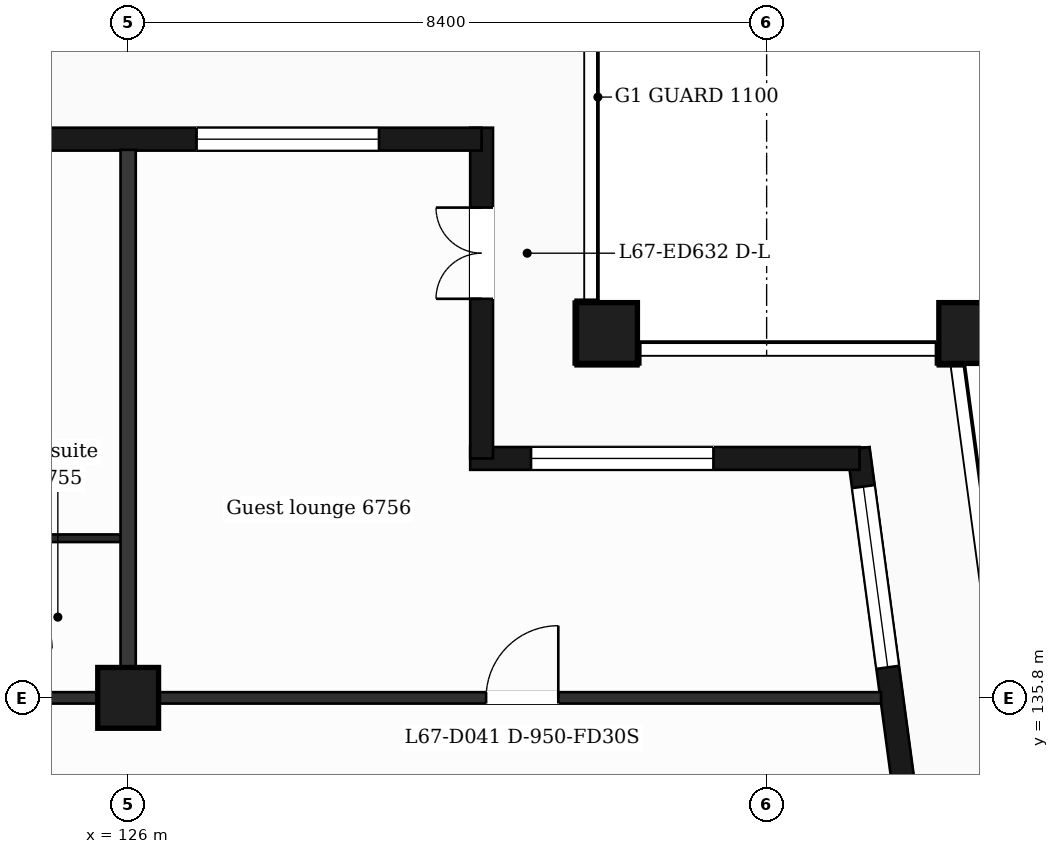
"""IFC4 building model, lengths in metres.
Left out: names, types, materials, properties, quantities, classifications, styles, units other than length and angle.
Written with IfcOpenShell. Run it as: python <this file> out.ifc"""

import sys

from ifc_helpers import new_model, si_unit, direction, frame, frame_2d, origin, origin_2d, place, context, subcontext, project, spatial, rectangle, extrude, element, fill, save


model = new_model("IFC4")
c1 = context("Model", 3, precision=1e-05, world=origin(), true_north=direction((0.0, 1.0)))
c2 = subcontext(c1, "Body", "Model", "MODEL_VIEW")
j1 = project(units=[si_unit("LENGTHUNIT", "METRE"), si_unit("PLANEANGLEUNIT", "RADIAN")], contexts=[c1])
p1 = place(None, origin())
s1 = spatial("IfcSite", under=j1, at=p1, CompositionType="ELEMENT")
p2 = place(p1, origin())
s2 = spatial("IfcBuilding", under=s1, at=p2, CompositionType="ELEMENT")
p3 = place(p2, frame((0.0, 0.0, 277.5)))
s3 = spatial("IfcBuildingStorey", under=s2, at=p3, CompositionType="ELEMENT", Elevation=277.5)
for number, where, z_axis, x_axis in (
    (1, (132.3, 140.6, 0.0), (0.0, 0.0, 1.0), (1.0, 0.0, 0.0)),
    (2, (137.065, 140.6, 0.0), (0.0, 0.0, 1.0), (1.0, 0.0, 0.0)),
    (3, (126.0, 135.8, 0.0), (0.0, 0.0, 1.0), (1.0, 0.0, 0.0)),
):
    element("IfcColumn", number, at=place(p3, frame(where, z_axis=z_axis, x_axis=x_axis)), inside=s3, PredefinedType="COLUMN", context=c2, shape_type="SweptSolid", body=[
        extrude(rectangle(XDim=0.8, YDim=0.8, at=origin_2d()), origin(), (0.0, 0.0, 1.0), 3.7),
    ])
p4 = place(p3, frame((136.504, 132.4, 0.0), z_axis=(0.0, 0.0, 1.0), x_axis=(-0.133399697462, 0.99106231929, 0.0)))
e4 = element("IfcWall", 4, at=p4, inside=s3, PredefinedType="SOLIDWALL", context=c2, shape_type="SweptSolid", body=[
    extrude(rectangle(XDim=6.74, YDim=0.3, at=frame_2d((3.37, 0.0))), origin(), (0.0, 0.0, 1.0), 3.38),
])
p5 = place(p4, frame((1.115, 0.0, 0.0)))
e5 = element("IfcOpeningElement", 5, at=p5, cuts=e4, PredefinedType="OPENING", context=c2, shape_type="SweptSolid", body=[
    extrude(rectangle(XDim=1.2, YDim=2.4, at=frame_2d((0.6, 1.2))), frame((0.0, 0.16, 0.0), z_axis=(0.0, -1.0, 0.0), x_axis=(1.0, 0.0, 0.0)), (0.0, 0.0, 1.0), 0.32),
])
p6 = place(p4, frame((3.835, 0.0, 0.9)))
e6 = element("IfcOpeningElement", 6, at=p6, cuts=e4, PredefinedType="OPENING", context=c2, shape_type="SweptSolid", body=[
    extrude(rectangle(XDim=2.4, YDim=2.1, at=frame_2d((1.2, 1.05))), frame((0.0, 0.16, 0.0), z_axis=(0.0, -1.0, 0.0), x_axis=(1.0, 0.0, 0.0)), (0.0, 0.0, 1.0), 0.32),
])
p7 = place(p3, frame((135.623, 138.95, 0.0), z_axis=(0.0, 0.0, 1.0), x_axis=(-1.0, 0.0, 0.0)))
e7 = element("IfcWall", 7, at=p7, inside=s3, PredefinedType="SOLIDWALL", context=c2, shape_type="SweptSolid", body=[
    extrude(rectangle(XDim=5.123, YDim=0.3, at=frame_2d((2.561, 0.0))), origin(), (0.0, 0.0, 1.0), 3.38),
])
p8 = place(p7, frame((1.923, 0.0, 0.9)))
e8 = element("IfcOpeningElement", 8, at=p8, cuts=e7, PredefinedType="OPENING", context=c2, shape_type="SweptSolid", body=[
    extrude(rectangle(XDim=2.4, YDim=2.1, at=frame_2d((1.2, 1.05))), frame((0.0, 0.16, 0.0), z_axis=(0.0, -1.0, 0.0), x_axis=(1.0, 0.0, 0.0)), (0.0, 0.0, 1.0), 0.32),
])
p9 = place(p3, frame((130.65, 138.95, 0.0), z_axis=(0.0, 0.0, 1.0), x_axis=(0.0, 1.0, 0.0)))
e9 = element("IfcWall", 9, at=p9, inside=s3, PredefinedType="SOLIDWALL", context=c2, shape_type="SweptSolid", body=[
    extrude(rectangle(XDim=4.35, YDim=0.3, at=frame_2d((2.175, 0.0))), origin(), (0.0, 0.0, 1.0), 3.38),
])
p10 = place(p9, frame((2.1, 0.0, 0.0)))
e10 = element("IfcOpeningElement", 10, at=p10, cuts=e9, PredefinedType="OPENING", context=c2, shape_type="SweptSolid", body=[
    extrude(rectangle(XDim=1.2, YDim=2.4, at=frame_2d((0.6, 1.2))), frame((0.0, 0.16, 0.0), z_axis=(0.0, -1.0, 0.0), x_axis=(1.0, 0.0, 0.0)), (0.0, 0.0, 1.0), 0.32),
])
p11 = place(p3, frame((130.65, 143.15, 0.0), z_axis=(0.0, 0.0, 1.0), x_axis=(-1.0, 0.0, 0.0)))
e11 = element("IfcWall", 11, at=p11, inside=s3, PredefinedType="SOLIDWALL", context=c2, shape_type="SweptSolid", body=[
    extrude(rectangle(XDim=14.25, YDim=0.3, at=frame_2d((7.125, 0.0))), origin(), (0.0, 0.0, 1.0), 3.38),
])
p12 = place(p11, frame((1.35, 0.0, 0.9)))
e12 = element("IfcOpeningElement", 12, at=p12, cuts=e11, PredefinedType="OPENING", context=c2, shape_type="SweptSolid", body=[
    extrude(rectangle(XDim=2.4, YDim=2.1, at=frame_2d((1.2, 1.05))), frame((0.0, 0.16, 0.0), z_axis=(0.0, -1.0, 0.0), x_axis=(1.0, 0.0, 0.0)), (0.0, 0.0, 1.0), 0.32),
])
p13 = place(p11, frame((6.15, 0.0, 0.0)))
e13 = element("IfcOpeningElement", 13, at=p13, cuts=e11, PredefinedType="OPENING", context=c2, shape_type="SweptSolid", body=[
    extrude(rectangle(XDim=1.2, YDim=2.4, at=frame_2d((0.6, 1.2))), frame((0.0, 0.16, 0.0), z_axis=(0.0, -1.0, 0.0), x_axis=(1.0, 0.0, 0.0)), (0.0, 0.0, 1.0), 0.32),
])
p14 = place(p11, frame((9.75, 0.0, 0.9)))
e14 = element("IfcOpeningElement", 14, at=p14, cuts=e11, PredefinedType="OPENING", context=c2, shape_type="SweptSolid", body=[
    extrude(rectangle(XDim=2.4, YDim=2.1, at=frame_2d((1.2, 1.05))), frame((0.0, 0.16, 0.0), z_axis=(0.0, -1.0, 0.0), x_axis=(1.0, 0.0, 0.0)), (0.0, 0.0, 1.0), 0.32),
])
p15 = place(p3, frame((90.895, 135.8, 0.0), z_axis=(0.0, 0.0, 1.0), x_axis=(1.0, 0.0, 0.0)))
e15 = element("IfcWall", 15, at=p15, inside=s3, PredefinedType="PARTITIONING", context=c2, shape_type="SweptSolid", body=[
    extrude(rectangle(XDim=45.011, YDim=0.15, at=frame_2d((22.505, 0.0))), origin(), (0.0, 0.0, 1.0), 3.38),
])
p16 = place(p15, frame((8.005, 0.0, 0.0)))
e16 = element("IfcOpeningElement", 16, at=p16, cuts=e15, PredefinedType="OPENING", context=c2, shape_type="SweptSolid", body=[
    extrude(rectangle(XDim=1.0, YDim=2.1, at=frame_2d((0.5, 1.05))), frame((0.0, 0.085, 0.0), z_axis=(0.0, -1.0, 0.0), x_axis=(1.0, 0.0, 0.0)), (0.0, 0.0, 1.0), 0.17),
])
p17 = place(p15, frame((10.515, 0.0, 0.0)))
e17 = element("IfcOpeningElement", 17, at=p17, cuts=e15, PredefinedType="OPENING", context=c2, shape_type="SweptSolid", body=[
    extrude(rectangle(XDim=1.0, YDim=2.1, at=frame_2d((0.5, 1.05))), frame((0.0, 0.085, 0.0), z_axis=(0.0, -1.0, 0.0), x_axis=(1.0, 0.0, 0.0)), (0.0, 0.0, 1.0), 0.17),
])
p18 = place(p15, frame((20.156, 0.0, 0.0)))
e18 = element("IfcOpeningElement", 18, at=p18, cuts=e15, PredefinedType="OPENING", context=c2, shape_type="SweptSolid", body=[
    extrude(rectangle(XDim=1.0, YDim=2.1, at=frame_2d((0.5, 1.05))), frame((0.0, 0.085, 0.0), z_axis=(0.0, -1.0, 0.0), x_axis=(1.0, 0.0, 0.0)), (0.0, 0.0, 1.0), 0.17),
])
p19 = place(p15, frame((24.13, 0.0, 0.0)))
e19 = element("IfcOpeningElement", 19, at=p19, cuts=e15, PredefinedType="OPENING", context=c2, shape_type="SweptSolid", body=[
    extrude(rectangle(XDim=0.95, YDim=2.1, at=frame_2d((0.475, 1.05))), frame((0.0, 0.085, 0.0), z_axis=(0.0, -1.0, 0.0), x_axis=(1.0, 0.0, 0.0)), (0.0, 0.0, 1.0), 0.17),
])
p20 = place(p15, frame((29.492, 0.0, 0.0)))
e20 = element("IfcOpeningElement", 20, at=p20, cuts=e15, PredefinedType="OPENING", context=c2, shape_type="SweptSolid", body=[
    extrude(rectangle(XDim=0.95, YDim=2.1, at=frame_2d((0.475, 1.05))), frame((0.0, 0.085, 0.0), z_axis=(0.0, -1.0, 0.0), x_axis=(1.0, 0.0, 0.0)), (0.0, 0.0, 1.0), 0.17),
])
p21 = place(p15, frame((31.705, 0.0, 0.0)))
e21 = element("IfcOpeningElement", 21, at=p21, cuts=e15, PredefinedType="OPENING", context=c2, shape_type="SweptSolid", body=[
    extrude(rectangle(XDim=0.95, YDim=2.1, at=frame_2d((0.475, 1.05))), frame((0.0, 0.085, 0.0), z_axis=(0.0, -1.0, 0.0), x_axis=(1.0, 0.0, 0.0)), (0.0, 0.0, 1.0), 0.17),
])
p22 = place(p15, frame((39.814, 0.0, 0.0)))
e22 = element("IfcOpeningElement", 22, at=p22, cuts=e15, PredefinedType="OPENING", context=c2, shape_type="SweptSolid", body=[
    extrude(rectangle(XDim=0.95, YDim=2.1, at=frame_2d((0.475, 1.05))), frame((0.0, 0.085, 0.0), z_axis=(0.0, -1.0, 0.0), x_axis=(1.0, 0.0, 0.0)), (0.0, 0.0, 1.0), 0.17),
])
p23 = place(p3, frame((124.15, 137.9, 0.0), z_axis=(0.0, 0.0, 1.0), x_axis=(1.0, 0.0, 0.0)))
e23 = element("IfcWall", 23, at=p23, inside=s3, PredefinedType="PARTITIONING", context=c2, shape_type="SweptSolid", body=[
    extrude(rectangle(XDim=1.85, YDim=0.1, at=frame_2d((0.925, 0.0))), origin(), (0.0, 0.0, 1.0), 3.38),
])
p24 = place(p3, frame((126.0, 135.875, 0.0), z_axis=(0.0, 0.0, 1.0), x_axis=(0.0, 1.0, 0.0)))
e24 = element("IfcWall", 24, at=p24, inside=s3, PredefinedType="PARTITIONING", context=c2, shape_type="SweptSolid", body=[
    extrude(rectangle(XDim=7.135, YDim=0.2, at=frame_2d((3.567, 0.0))), origin(), (0.0, 0.0, 1.0), 3.38),
])
p25 = place(p6, origin())
e25 = element("IfcWindow", 25, at=p25, inside=s3, PartitioningType="SINGLE_PANEL", PredefinedType="WINDOW", context=c2, shape_type="SweptSolid", body=[
    extrude(rectangle(XDim=2.4, YDim=2.1, at=frame_2d((1.2, 1.05))), frame((0.0, 0.03, 0.0), z_axis=(0.0, -1.0, 0.0), x_axis=(1.0, 0.0, 0.0)), (0.0, 0.0, 1.0), 0.06),
])
fill(e6, e25)
p26 = place(p8, origin())
e26 = element("IfcWindow", 26, at=p26, inside=s3, PartitioningType="SINGLE_PANEL", PredefinedType="WINDOW", context=c2, shape_type="SweptSolid", body=[
    extrude(rectangle(XDim=2.4, YDim=2.1, at=frame_2d((1.2, 1.05))), frame((0.0, 0.03, 0.0), z_axis=(0.0, -1.0, 0.0), x_axis=(1.0, 0.0, 0.0)), (0.0, 0.0, 1.0), 0.06),
])
fill(e8, e26)
p27 = place(p10, origin())
e27 = element("IfcDoor", 27, at=p27, inside=s3, OperationType="DOUBLE_DOOR_SINGLE_SWING", PredefinedType="DOOR", context=c2, shape_type="SweptSolid", body=[
    extrude(rectangle(XDim=1.2, YDim=2.4, at=frame_2d((0.6, 1.2))), frame((0.0, 0.025, 0.0), z_axis=(0.0, -1.0, 0.0), x_axis=(1.0, 0.0, 0.0)), (0.0, 0.0, 1.0), 0.05),
])
fill(e10, e27)
p28 = place(p12, origin())
e28 = element("IfcWindow", 28, at=p28, inside=s3, PartitioningType="SINGLE_PANEL", PredefinedType="WINDOW", context=c2, shape_type="SweptSolid", body=[
    extrude(rectangle(XDim=2.4, YDim=2.1, at=frame_2d((1.2, 1.05))), frame((0.0, 0.03, 0.0), z_axis=(0.0, -1.0, 0.0), x_axis=(1.0, 0.0, 0.0)), (0.0, 0.0, 1.0), 0.06),
])
fill(e12, e28)
p29 = place(p22, origin())
e29 = element("IfcDoor", 29, at=p29, inside=s3, OperationType="SINGLE_SWING_RIGHT", PredefinedType="DOOR", context=c2, shape_type="SweptSolid", body=[
    extrude(rectangle(XDim=0.95, YDim=2.1, at=frame_2d((0.475, 1.05))), frame((0.0, 0.025, 0.0), z_axis=(0.0, -1.0, 0.0), x_axis=(1.0, 0.0, 0.0)), (0.0, 0.0, 1.0), 0.05),
])
fill(e22, e29)
save(model, sys.argv[1])
